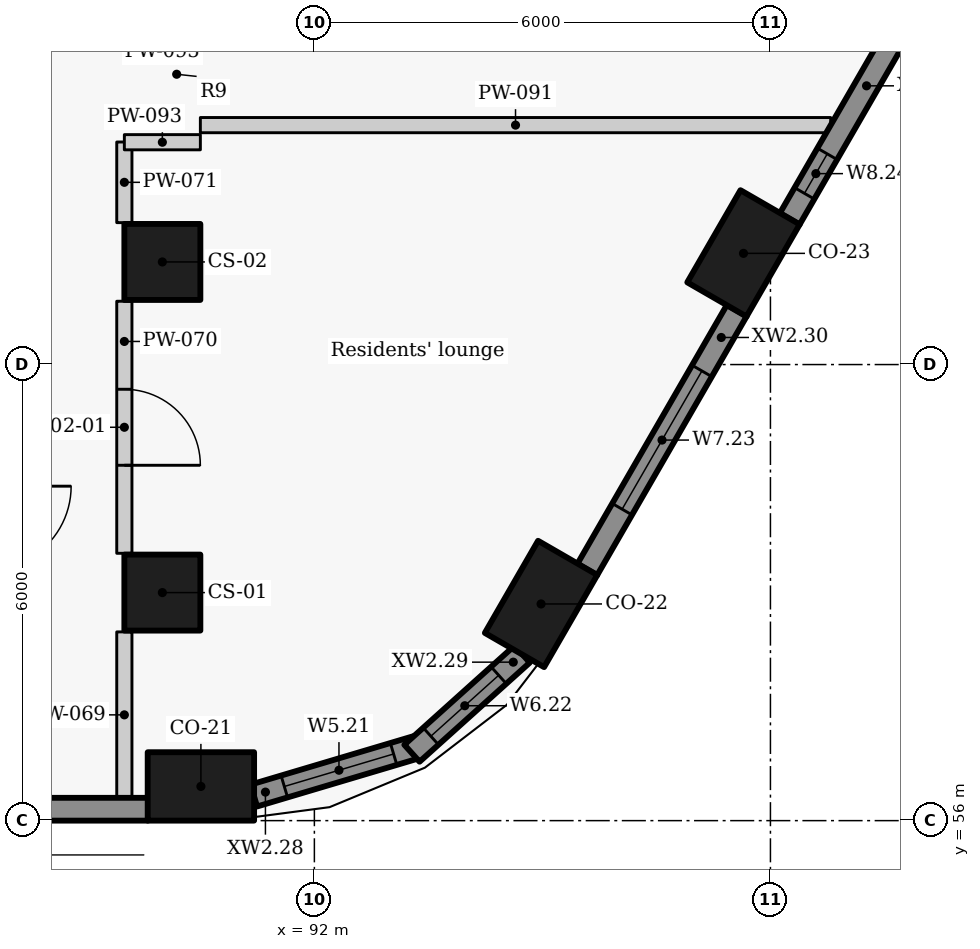
"""IFC4 building model, lengths in metres.
Left out: names, types, materials, properties, quantities, classifications, styles, units other than length and angle.
Written with IfcOpenShell. Run it as: python <this file> out.ifc"""

import sys

from ifc_helpers import new_model, si_unit, direction, frame, frame_2d, origin, origin_2d, place, context, subcontext, project, spatial, rectangle, extrude, element, fill, save


model = new_model("IFC4")
c1 = context("Model", 3, precision=1e-05, world=origin(), true_north=direction((0.0, 1.0)))
c2 = subcontext(c1, "Body", "Model", "MODEL_VIEW")
j1 = project(units=[si_unit("LENGTHUNIT", "METRE"), si_unit("PLANEANGLEUNIT", "RADIAN")], contexts=[c1])
p1 = place(None, origin())
s1 = spatial("IfcSite", under=j1, at=p1, CompositionType="ELEMENT")
p2 = place(p1, origin())
s2 = spatial("IfcBuilding", under=s1, at=p2, CompositionType="ELEMENT")
p3 = place(p2, frame((0.0, 0.0, 114.0)))
s3 = spatial("IfcBuildingStorey", under=s2, at=p3, CompositionType="ELEMENT", Elevation=114.0)
for number, where, z_axis, x_axis in (
    (1, (90.507, 56.45, 0.0), (0.0, 0.0, 1.0), (1.0, 0.0, 0.0)),
    (2, (94.982, 58.851, 0.0), (0.0, 0.0, 1.0), (0.5, 0.866, 0.0)),
    (3, (97.646, 63.463, 0.0), (0.0, 0.0, 1.0), (0.5, 0.866, 0.0)),
):
    element("IfcColumn", number, at=place(p3, frame(where, z_axis=z_axis, x_axis=x_axis)), inside=s3, PredefinedType="COLUMN", context=c2, shape_type="SweptSolid", body=[
        extrude(rectangle(XDim=1.4, YDim=0.9, at=origin_2d()), origin(), (0.0, 0.0, 1.0), 3.3),
    ])
for number, where, z_axis, x_axis in (
    (4, (90.0, 59.0, 0.0), (0.0, 0.0, 1.0), (0.0, 1.0, 0.0)),
    (5, (90.0, 63.35, 0.0), (0.0, 0.0, 1.0), (0.0, 1.0, 0.0)),
):
    element("IfcColumn", number, at=place(p3, frame(where, z_axis=z_axis, x_axis=x_axis)), inside=s3, PredefinedType="COLUMN", context=c2, shape_type="SweptSolid", body=[
        extrude(rectangle(XDim=1.0, YDim=1.0, at=origin_2d()), origin(), (0.0, 0.0, 1.0), 3.3),
    ])
p4 = place(p3, frame((69.871, 56.15, 0.0), z_axis=(0.0, 0.0, 1.0), x_axis=(1.0, 0.0, 0.0)))
e6 = element("IfcWall", 6, at=p4, inside=s3, PredefinedType="SOLIDWALL", context=c2, shape_type="SweptSolid", body=[
    extrude(rectangle(XDim=19.94, YDim=0.3, at=frame_2d((9.97, 0.0))), origin(), (0.0, 0.0, 1.0), 2.425),
])
p5 = place(p3, frame((91.203, 56.33, 0.0), z_axis=(0.0, 0.0, 1.0), x_axis=(0.95847736903, 0.285168604614, 0.0)))
e7 = element("IfcWall", 7, at=p5, inside=s3, PredefinedType="SOLIDWALL", context=c2, shape_type="SweptSolid", body=[
    extrude(rectangle(XDim=2.262, YDim=0.3, at=frame_2d((1.131, 0.0))), origin(), (0.0, 0.0, 1.0), 2.425),
])
p6 = place(p5, frame((0.419, 0.0, 0.9)))
e8 = element("IfcOpeningElement", 8, at=p6, cuts=e7, PredefinedType="OPENING", context=c2, shape_type="SweptSolid", body=[
    extrude(rectangle(XDim=1.5, YDim=1.1, at=frame_2d((0.75, 0.55))), frame((0.0, 0.16, 0.0), z_axis=(0.0, -1.0, 0.0), x_axis=(1.0, 0.0, 0.0)), (0.0, 0.0, 1.0), 0.32),
])
p7 = place(p3, frame((93.283, 56.887, 0.0), z_axis=(0.0, 0.0, 1.0), x_axis=(0.743785734967, 0.668418117992, 0.0)))
e9 = element("IfcWall", 9, at=p7, inside=s3, PredefinedType="SOLIDWALL", context=c2, shape_type="SweptSolid", body=[
    extrude(rectangle(XDim=1.95, YDim=0.3, at=frame_2d((0.975, 0.0))), origin(), (0.0, 0.0, 1.0), 2.425),
])
p8 = place(p7, frame((0.335, 0.0, 0.9)))
e10 = element("IfcOpeningElement", 10, at=p8, cuts=e9, PredefinedType="OPENING", context=c2, shape_type="SweptSolid", body=[
    extrude(rectangle(XDim=1.2, YDim=1.1, at=frame_2d((0.6, 0.55))), frame((0.0, 0.16, 0.0), z_axis=(0.0, -1.0, 0.0), x_axis=(1.0, 0.0, 0.0)), (0.0, 0.0, 1.0), 0.32),
])
p9 = place(p3, frame((95.59, 59.303, 0.0), z_axis=(0.0, 0.0, 1.0), x_axis=(0.500003583557, 0.866023334807, 0.0)))
e11 = element("IfcWall", 11, at=p9, inside=s3, PredefinedType="SOLIDWALL", context=c2, shape_type="SweptSolid", body=[
    extrude(rectangle(XDim=3.934, YDim=0.3, at=frame_2d((1.967, 0.0))), origin(), (0.0, 0.0, 1.0), 2.425),
])
p10 = place(p9, frame((0.917, 0.0, 0.9)))
e12 = element("IfcOpeningElement", 12, at=p10, cuts=e11, PredefinedType="OPENING", context=c2, shape_type="SweptSolid", body=[
    extrude(rectangle(XDim=2.1, YDim=1.1, at=frame_2d((1.05, 0.55))), frame((0.0, 0.16, 0.0), z_axis=(0.0, -1.0, 0.0), x_axis=(1.0, 0.0, 0.0)), (0.0, 0.0, 1.0), 0.32),
])
p11 = place(p3, frame((98.253, 63.916, 0.0), z_axis=(0.0, 0.0, 1.0), x_axis=(0.499957037901, 0.866050206543, 0.0)))
e13 = element("IfcWall", 13, at=p11, inside=s3, PredefinedType="SOLIDWALL", context=c2, shape_type="SweptSolid", body=[
    extrude(rectangle(XDim=3.934, YDim=0.3, at=frame_2d((1.967, 0.0))), origin(), (0.0, 0.0, 1.0), 2.425),
])
p12 = place(p11, frame((0.389, 0.0, 0.9)))
e14 = element("IfcOpeningElement", 14, at=p12, cuts=e13, PredefinedType="OPENING", context=c2, shape_type="SweptSolid", body=[
    extrude(rectangle(XDim=0.6, YDim=1.1, at=frame_2d((0.3, 0.55))), frame((0.0, 0.16, 0.0), z_axis=(0.0, -1.0, 0.0), x_axis=(1.0, 0.0, 0.0)), (0.0, 0.0, 1.0), 0.32),
])
p13 = place(p11, frame((3.056, 0.0, 0.9)))
e15 = element("IfcOpeningElement", 15, at=p13, cuts=e13, PredefinedType="OPENING", context=c2, shape_type="SweptSolid", body=[
    extrude(rectangle(XDim=0.6, YDim=1.1, at=frame_2d((0.3, 0.55))), frame((0.0, 0.16, 0.0), z_axis=(0.0, -1.0, 0.0), x_axis=(1.0, 0.0, 0.0)), (0.0, 0.0, 1.0), 0.32),
])
p14 = place(p3, frame((89.5, 56.3, 0.0), z_axis=(0.0, 0.0, 1.0), x_axis=(0.0, 1.0, 0.0)))
e16 = element("IfcWall", 16, at=p14, inside=s3, PredefinedType="PARTITIONING", context=c2, shape_type="SweptSolid", body=[
    extrude(rectangle(XDim=2.183, YDim=0.2, at=frame_2d((1.091, 0.0))), origin(), (0.0, 0.0, 1.0), 3.025),
])
p15 = place(p3, frame((89.5, 62.833, 0.0), z_axis=(0.0, 0.0, 1.0), x_axis=(0.0, -1.0, 0.0)))
e17 = element("IfcWall", 17, at=p15, inside=s3, PredefinedType="PARTITIONING", context=c2, shape_type="SweptSolid", body=[
    extrude(rectangle(XDim=3.316, YDim=0.2, at=frame_2d((1.658, 0.0))), origin(), (0.0, 0.0, 1.0), 3.025),
])
p16 = place(p15, frame((1.158, 0.0, 0.0)))
e18 = element("IfcOpeningElement", 18, at=p16, cuts=e17, PredefinedType="OPENING", context=c2, shape_type="SweptSolid", body=[
    extrude(rectangle(XDim=1.0, YDim=2.1, at=frame_2d((0.5, 1.05))), frame((0.0, 0.11, 0.0), z_axis=(0.0, -1.0, 0.0), x_axis=(1.0, 0.0, 0.0)), (0.0, 0.0, 1.0), 0.22),
])
p17 = place(p3, frame((89.5, 63.867, 0.0), z_axis=(0.0, 0.0, 1.0), x_axis=(0.0, 1.0, 0.0)))
e19 = element("IfcWall", 19, at=p17, inside=s3, PredefinedType="PARTITIONING", context=c2, shape_type="SweptSolid", body=[
    extrude(rectangle(XDim=1.061, YDim=0.2, at=frame_2d((0.531, 0.0))), origin(), (0.0, 0.0, 1.0), 3.025),
])
p18 = place(p3, frame((90.5, 65.15, 0.0), z_axis=(0.0, 0.0, 1.0), x_axis=(1.0, 0.0, 0.0)))
e20 = element("IfcWall", 20, at=p18, inside=s3, PredefinedType="PARTITIONING", context=c2, shape_type="SweptSolid", body=[
    extrude(rectangle(XDim=8.293, YDim=0.2, at=frame_2d((4.146, 0.0))), origin(), (0.0, 0.0, 1.0), 2.405),
])
p19 = place(p3, frame((89.5, 64.925, 0.0), z_axis=(0.0, 0.0, 1.0), x_axis=(1.0, 0.0, 0.0)))
e21 = element("IfcWall", 21, at=p19, inside=s3, PredefinedType="PARTITIONING", context=c2, shape_type="SweptSolid", body=[
    extrude(rectangle(XDim=1.0, YDim=0.2, at=frame_2d((0.5, 0.0))), origin(), (0.0, 0.0, 1.0), 2.505),
])
p20 = place(p6, origin())
e22 = element("IfcWindow", 22, at=p20, inside=s3, PartitioningType="SINGLE_PANEL", PredefinedType="WINDOW", context=c2, shape_type="SweptSolid", body=[
    extrude(rectangle(XDim=1.5, YDim=1.1, at=frame_2d((0.75, 0.55))), frame((0.0, 0.03, 0.0), z_axis=(0.0, -1.0, 0.0), x_axis=(1.0, 0.0, 0.0)), (0.0, 0.0, 1.0), 0.06),
])
fill(e8, e22)
p21 = place(p8, origin())
e23 = element("IfcWindow", 23, at=p21, inside=s3, PartitioningType="SINGLE_PANEL", PredefinedType="WINDOW", context=c2, shape_type="SweptSolid", body=[
    extrude(rectangle(XDim=1.2, YDim=1.1, at=frame_2d((0.6, 0.55))), frame((0.0, 0.03, 0.0), z_axis=(0.0, -1.0, 0.0), x_axis=(1.0, 0.0, 0.0)), (0.0, 0.0, 1.0), 0.06),
])
fill(e10, e23)
p22 = place(p10, origin())
e24 = element("IfcWindow", 24, at=p22, inside=s3, PartitioningType="SINGLE_PANEL", PredefinedType="WINDOW", context=c2, shape_type="SweptSolid", body=[
    extrude(rectangle(XDim=2.1, YDim=1.1, at=frame_2d((1.05, 0.55))), frame((0.0, 0.03, 0.0), z_axis=(0.0, -1.0, 0.0), x_axis=(1.0, 0.0, 0.0)), (0.0, 0.0, 1.0), 0.06),
])
fill(e12, e24)
p23 = place(p12, origin())
e25 = element("IfcWindow", 25, at=p23, inside=s3, PartitioningType="SINGLE_PANEL", PredefinedType="WINDOW", context=c2, shape_type="SweptSolid", body=[
    extrude(rectangle(XDim=0.6, YDim=1.1, at=frame_2d((0.3, 0.55))), frame((0.0, 0.03, 0.0), z_axis=(0.0, -1.0, 0.0), x_axis=(1.0, 0.0, 0.0)), (0.0, 0.0, 1.0), 0.06),
])
fill(e14, e25)
p24 = place(p16, origin())
e26 = element("IfcDoor", 26, at=p24, inside=s3, OperationType="SINGLE_SWING_RIGHT", PredefinedType="DOOR", context=c2, shape_type="SweptSolid", body=[
    extrude(rectangle(XDim=1.0, YDim=2.1, at=frame_2d((0.5, 1.05))), frame((0.0, 0.025, 0.0), z_axis=(0.0, -1.0, 0.0), x_axis=(1.0, 0.0, 0.0)), (0.0, 0.0, 1.0), 0.05),
])
fill(e18, e26)
save(model, sys.argv[1])
